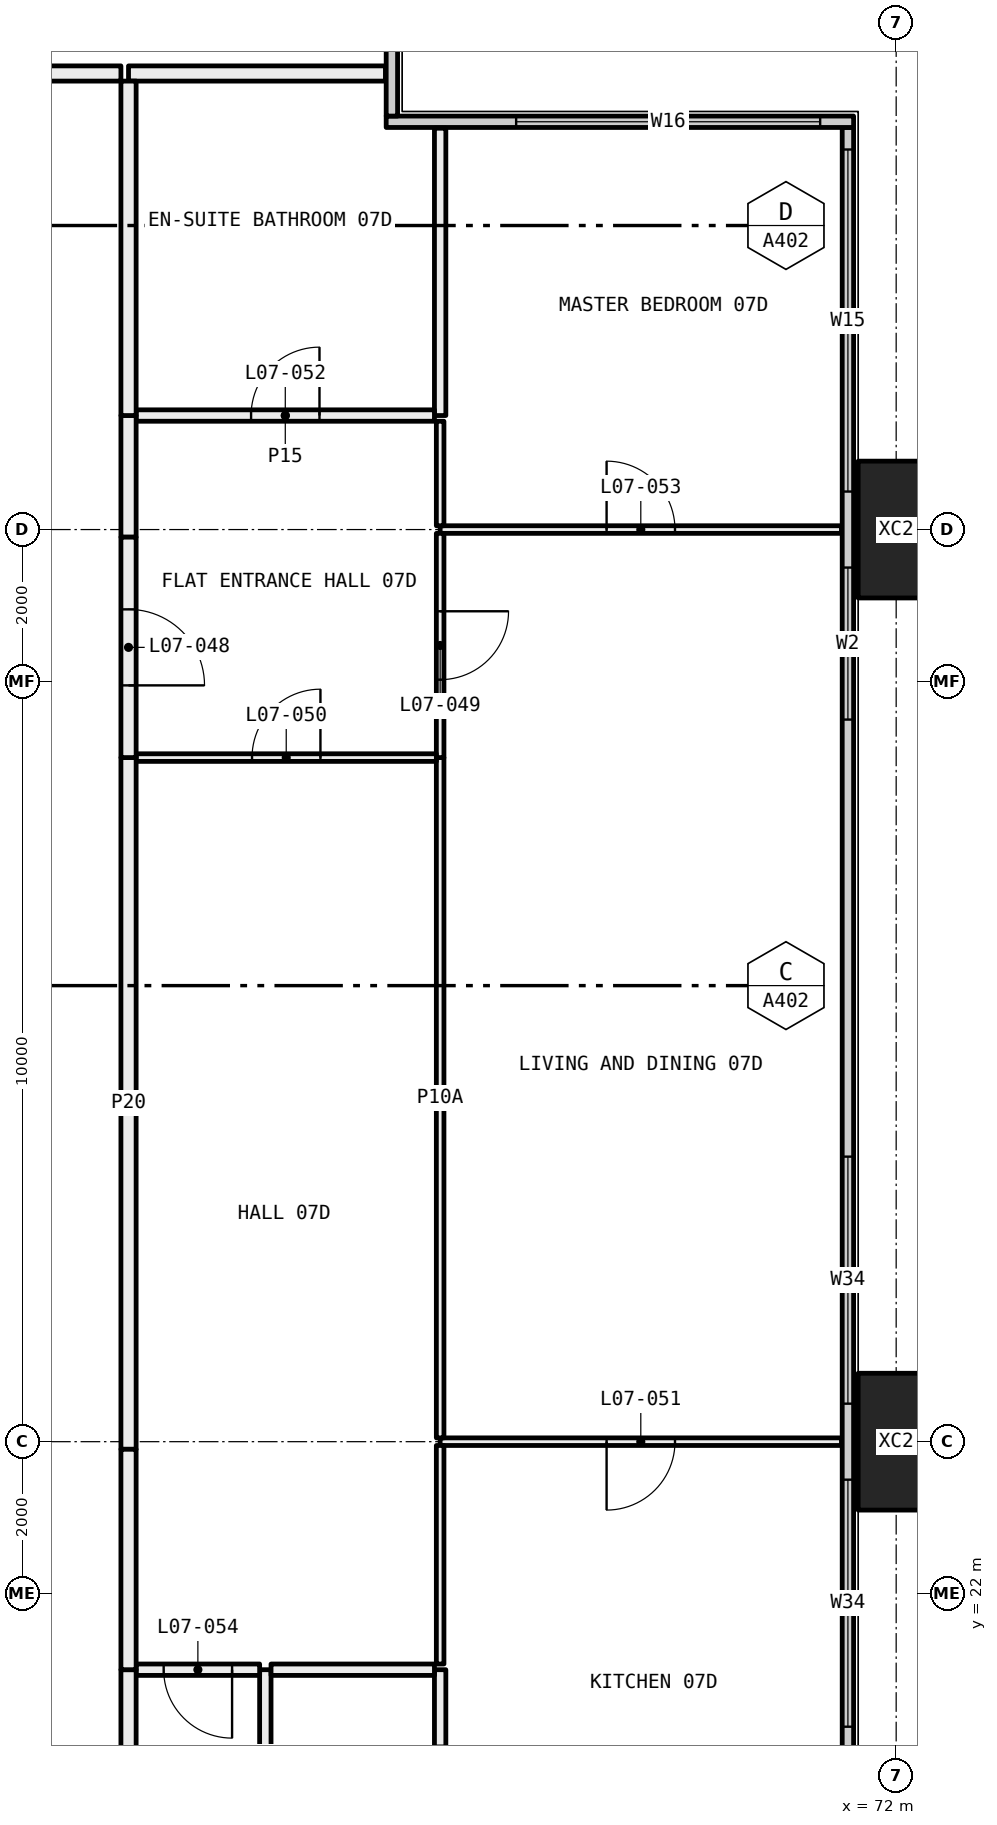
"""IFC4 building model, lengths in metres.
Left out: names, types, materials, properties, quantities, classifications, styles, units other than length and angle.
Written with IfcOpenShell. Run it as: python <this file> out.ifc"""

import sys

from ifc_helpers import new_model, si_unit, direction, frame, frame_2d, origin, origin_2d, place, context, subcontext, project, spatial, rectangle, hollow_rectangle, extrude, element, fill, save


model = new_model("IFC4")
c1 = context("Model", 3, precision=1e-05, world=origin(), true_north=direction((0.0, 1.0)))
c2 = subcontext(c1, "Body", "Model", "MODEL_VIEW")
j1 = project(units=[si_unit("LENGTHUNIT", "METRE"), si_unit("PLANEANGLEUNIT", "RADIAN")], contexts=[c1])
p1 = place(None, origin())
s1 = spatial("IfcSite", under=j1, at=p1, CompositionType="ELEMENT")
p2 = place(p1, origin())
s2 = spatial("IfcBuilding", under=s1, at=p2, CompositionType="ELEMENT")
p3 = place(p2, frame((0.0, 0.0, 36.9)))
s3 = spatial("IfcBuildingStorey", under=s2, at=p3, CompositionType="ELEMENT", Elevation=36.9)
for number, where, z_axis, x_axis in (
    (1, (72.0, 24.0, -0.4), (0.0, 0.0, 1.0), (0.0, 1.0, 0.0)),
    (2, (72.0, 36.0, -0.4), (0.0, 0.0, 1.0), (0.0, 1.0, 0.0)),
):
    element("IfcColumn", number, at=place(p3, frame(where, z_axis=z_axis, x_axis=x_axis)), inside=s3, PredefinedType="COLUMN", context=c2, shape_type="SweptSolid", body=[
        extrude(hollow_rectangle(XDim=1.8, YDim=1.0, WallThickness=0.07, at=origin_2d()), origin(), (0.0, 0.0, 1.0), 3.45),
    ])
p4 = place(p3, frame((71.365, 6.71, 0.0), z_axis=(0.0, 0.0, 1.0), x_axis=(0.0, 1.0, 0.0)))
e3 = element("IfcWall", 3, at=p4, inside=s3, PredefinedType="ELEMENTEDWALL", context=c2, shape_type="SweptSolid", body=[
    extrude(rectangle(XDim=34.58, YDim=0.15, at=frame_2d((17.29, 0.0))), origin(), (0.0, 0.0, 1.0), 3.05),
])
p5 = place(p4, frame((0.29, 0.0, 0.45)))
e4 = element("IfcOpeningElement", 4, at=p5, cuts=e3, PredefinedType="OPENING", context=c2, shape_type="SweptSolid", body=[
    extrude(rectangle(XDim=4.5, YDim=2.55, at=frame_2d((2.25, 1.275))), frame((0.0, 0.085, 0.0), z_axis=(0.0, -1.0, 0.0), x_axis=(1.0, 0.0, 0.0)), (0.0, 0.0, 1.0), 0.17),
])
p6 = place(p4, frame((5.79, 0.0, 0.45)))
e5 = element("IfcOpeningElement", 5, at=p6, cuts=e3, PredefinedType="OPENING", context=c2, shape_type="SweptSolid", body=[
    extrude(rectangle(XDim=3.25, YDim=2.55, at=frame_2d((1.625, 1.275))), frame((0.0, 0.085, 0.0), z_axis=(0.0, -1.0, 0.0), x_axis=(1.0, 0.0, 0.0)), (0.0, 0.0, 1.0), 0.17),
])
p7 = place(p4, frame((13.54, 0.0, 0.45)))
e6 = element("IfcOpeningElement", 6, at=p7, cuts=e3, PredefinedType="OPENING", context=c2, shape_type="SweptSolid", body=[
    extrude(rectangle(XDim=3.25, YDim=2.55, at=frame_2d((1.625, 1.275))), frame((0.0, 0.085, 0.0), z_axis=(0.0, -1.0, 0.0), x_axis=(1.0, 0.0, 0.0)), (0.0, 0.0, 1.0), 0.17),
])
p8 = place(p4, frame((17.79, 0.0, 0.45)))
e7 = element("IfcOpeningElement", 7, at=p8, cuts=e3, PredefinedType="OPENING", context=c2, shape_type="SweptSolid", body=[
    extrude(rectangle(XDim=3.25, YDim=2.55, at=frame_2d((1.625, 1.275))), frame((0.0, 0.085, 0.0), z_axis=(0.0, -1.0, 0.0), x_axis=(1.0, 0.0, 0.0)), (0.0, 0.0, 1.0), 0.17),
])
p9 = place(p4, frame((26.79, 0.0, 0.45)))
e8 = element("IfcOpeningElement", 8, at=p9, cuts=e3, PredefinedType="OPENING", context=c2, shape_type="SweptSolid", body=[
    extrude(rectangle(XDim=2.0, YDim=2.55, at=frame_2d((1.0, 1.275))), frame((0.0, 0.085, 0.0), z_axis=(0.0, -1.0, 0.0), x_axis=(1.0, 0.0, 0.0)), (0.0, 0.0, 1.0), 0.17),
])
p10 = place(p4, frame((29.79, 0.0, 0.45)))
e9 = element("IfcOpeningElement", 9, at=p10, cuts=e3, PredefinedType="OPENING", context=c2, shape_type="SweptSolid", body=[
    extrude(rectangle(XDim=4.5, YDim=2.55, at=frame_2d((2.25, 1.275))), frame((0.0, 0.085, 0.0), z_axis=(0.0, -1.0, 0.0), x_axis=(1.0, 0.0, 0.0)), (0.0, 0.0, 1.0), 0.17),
])
p11 = place(p3, frame((65.29, 41.365, 0.0), z_axis=(0.0, 0.0, 1.0), x_axis=(1.0, 0.0, 0.0)))
e10 = element("IfcWall", 10, at=p11, inside=s3, PredefinedType="ELEMENTEDWALL", context=c2, shape_type="SweptSolid", body=[
    extrude(rectangle(XDim=6.15, YDim=0.15, at=frame_2d((3.075, 0.0))), origin(), (0.0, 0.0, 1.0), 3.05),
])
p12 = place(p11, frame((1.71, 0.0, 0.45)))
e11 = element("IfcOpeningElement", 11, at=p12, cuts=e10, PredefinedType="OPENING", context=c2, shape_type="SweptSolid", body=[
    extrude(rectangle(XDim=4.0, YDim=2.55, at=frame_2d((2.0, 1.275))), frame((0.0, 0.085, 0.0), z_axis=(0.0, -1.0, 0.0), x_axis=(1.0, 0.0, 0.0)), (0.0, 0.0, 1.0), 0.17),
])
p13 = place(p3, frame((65.365, 41.44, 0.0), z_axis=(0.0, 0.0, 1.0), x_axis=(0.0, 1.0, 0.0)))
e12 = element("IfcWall", 12, at=p13, inside=s3, PredefinedType="ELEMENTEDWALL", context=c2, shape_type="SweptSolid", body=[
    extrude(rectangle(XDim=5.85, YDim=0.15, at=frame_2d((2.925, 0.0))), origin(), (0.0, 0.0, 1.0), 3.05),
])
p14 = place(p13, frame((1.56, 0.0, 0.45)))
e13 = element("IfcOpeningElement", 13, at=p14, cuts=e12, PredefinedType="OPENING", context=c2, shape_type="SweptSolid", body=[
    extrude(rectangle(XDim=4.0, YDim=2.55, at=frame_2d((2.0, 1.275))), frame((0.0, 0.085, 0.0), z_axis=(0.0, -1.0, 0.0), x_axis=(1.0, 0.0, 0.0)), (0.0, 0.0, 1.0), 0.17),
])
p15 = place(p3, frame((71.28, 24.0, 0.0), z_axis=(0.0, 0.0, 1.0), x_axis=(-1.0, 0.0, 0.0)))
e14 = element("IfcWall", 14, at=p15, inside=s3, PredefinedType="PARTITIONING", context=c2, shape_type="SweptSolid", body=[
    extrude(rectangle(XDim=5.28, YDim=0.1, at=frame_2d((2.64, 0.0))), origin(), (0.0, 0.0, 1.0), 2.45),
])
p16 = place(p15, frame((2.19, 0.0, 0.0)))
e15 = element("IfcOpeningElement", 15, at=p16, cuts=e14, PredefinedType="OPENING", context=c2, shape_type="SweptSolid", body=[
    extrude(rectangle(XDim=0.9, YDim=2.1, at=frame_2d((0.45, 1.05))), frame((0.0, 0.06, 0.0), z_axis=(0.0, -1.0, 0.0), x_axis=(1.0, 0.0, 0.0)), (0.0, 0.0, 1.0), 0.12),
])
p17 = place(p3, frame((66.0, 21.0, 0.0), z_axis=(0.0, 0.0, 1.0), x_axis=(0.0, -1.0, 0.0)))
e16 = element("IfcWall", 16, at=p17, inside=s3, PredefinedType="PARTITIONING", context=c2, shape_type="SweptSolid", body=[
    extrude(rectangle(XDim=2.9, YDim=0.15, at=frame_2d((1.45, 0.0))), origin(), (0.0, 0.0, 1.0), 3.05),
])
p18 = place(p17, frame((1.0, 0.0, 0.0)))
e17 = element("IfcOpeningElement", 17, at=p18, cuts=e16, PredefinedType="OPENING", context=c2, shape_type="SweptSolid", body=[
    extrude(rectangle(XDim=0.9, YDim=2.1, at=frame_2d((0.45, 1.05))), frame((0.0, 0.085, 0.0), z_axis=(0.0, -1.0, 0.0), x_axis=(1.0, 0.0, 0.0)), (0.0, 0.0, 1.0), 0.17),
])
p19 = place(p3, frame((66.0, 23.95, 0.0), z_axis=(0.0, 0.0, 1.0), x_axis=(0.0, -1.0, 0.0)))
e18 = element("IfcWall", 18, at=p19, inside=s3, PredefinedType="PARTITIONING", context=c2, shape_type="SweptSolid", body=[
    extrude(rectangle(XDim=2.875, YDim=0.1, at=frame_2d((1.438, 0.0))), origin(), (0.0, 0.0, 1.0), 2.45),
])
p20 = place(p3, frame((71.28, 36.0, 0.0), z_axis=(0.0, 0.0, 1.0), x_axis=(-1.0, 0.0, 0.0)))
e19 = element("IfcWall", 19, at=p20, inside=s3, PredefinedType="PARTITIONING", context=c2, shape_type="SweptSolid", body=[
    extrude(rectangle(XDim=5.28, YDim=0.1, at=frame_2d((2.64, 0.0))), origin(), (0.0, 0.0, 1.0), 2.45),
])
p21 = place(p20, frame((2.19, 0.0, 0.0)))
e20 = element("IfcOpeningElement", 20, at=p21, cuts=e19, PredefinedType="OPENING", context=c2, shape_type="SweptSolid", body=[
    extrude(rectangle(XDim=0.9, YDim=2.1, at=frame_2d((0.45, 1.05))), frame((0.0, 0.06, 0.0), z_axis=(0.0, -1.0, 0.0), x_axis=(1.0, 0.0, 0.0)), (0.0, 0.0, 1.0), 0.12),
])
p22 = place(p3, frame((66.0, 33.0, 0.0), z_axis=(0.0, 0.0, 1.0), x_axis=(0.0, -1.0, 0.0)))
e21 = element("IfcWall", 21, at=p22, inside=s3, PredefinedType="PARTITIONING", context=c2, shape_type="SweptSolid", body=[
    extrude(rectangle(XDim=8.95, YDim=0.1, at=frame_2d((4.475, 0.0))), origin(), (0.0, 0.0, 1.0), 2.45),
])
p23 = place(p3, frame((66.0, 35.95, 0.0), z_axis=(0.0, 0.0, 1.0), x_axis=(0.0, -1.0, 0.0)))
e22 = element("IfcWall", 22, at=p23, inside=s3, PredefinedType="PARTITIONING", context=c2, shape_type="SweptSolid", body=[
    extrude(rectangle(XDim=2.95, YDim=0.1, at=frame_2d((1.475, 0.0))), origin(), (0.0, 0.0, 1.0), 2.45),
])
p24 = place(p23, frame((1.025, 0.0, 0.0)))
e23 = element("IfcOpeningElement", 23, at=p24, cuts=e22, PredefinedType="OPENING", context=c2, shape_type="SweptSolid", body=[
    extrude(rectangle(XDim=0.9, YDim=2.1, at=frame_2d((0.45, 1.05))), frame((0.0, 0.06, 0.0), z_axis=(0.0, -1.0, 0.0), x_axis=(1.0, 0.0, 0.0)), (0.0, 0.0, 1.0), 0.12),
])
p25 = place(p3, frame((66.0, 37.425, 0.0), z_axis=(0.0, 0.0, 1.0), x_axis=(0.0, -1.0, 0.0)))
e24 = element("IfcWall", 24, at=p25, inside=s3, PredefinedType="PARTITIONING", context=c2, shape_type="SweptSolid", body=[
    extrude(rectangle(XDim=1.375, YDim=0.1, at=frame_2d((0.688, 0.0))), origin(), (0.0, 0.0, 1.0), 2.45),
])
p26 = place(p3, frame((66.0, 41.28, 0.0), z_axis=(0.0, 0.0, 1.0), x_axis=(0.0, -1.0, 0.0)))
e25 = element("IfcWall", 25, at=p26, inside=s3, PredefinedType="PARTITIONING", context=c2, shape_type="SweptSolid", body=[
    extrude(rectangle(XDim=3.78, YDim=0.15, at=frame_2d((1.89, 0.0))), origin(), (0.0, 0.0, 1.0), 3.05),
])
p27 = place(p3, frame((63.7, 18.1, 0.0), z_axis=(0.0, 0.0, 1.0), x_axis=(0.0, 1.0, 0.0)))
e26 = element("IfcWall", 26, at=p27, inside=s3, PredefinedType="PARTITIONING", context=c2, shape_type="SweptSolid", body=[
    extrude(rectangle(XDim=2.9, YDim=0.15, at=frame_2d((1.45, 0.0))), origin(), (0.0, 0.0, 1.0), 3.05),
])
p28 = place(p3, frame((63.625, 21.0, 0.0), z_axis=(0.0, 0.0, 1.0), x_axis=(-1.0, 0.0, 0.0)))
e27 = element("IfcWall", 27, at=p28, inside=s3, PredefinedType="PARTITIONING", context=c2, shape_type="SweptSolid", body=[
    extrude(rectangle(XDim=1.625, YDim=0.15, at=frame_2d((0.812, 0.0))), origin(), (0.0, 0.0, 1.0), 3.05),
])
p29 = place(p28, frame((0.363, 0.0, 0.0)))
e28 = element("IfcOpeningElement", 28, at=p29, cuts=e27, PredefinedType="OPENING", context=c2, shape_type="SweptSolid", body=[
    extrude(rectangle(XDim=0.9, YDim=2.1, at=frame_2d((0.45, 1.05))), frame((0.0, 0.085, 0.0), z_axis=(0.0, -1.0, 0.0), x_axis=(1.0, 0.0, 0.0)), (0.0, 0.0, 1.0), 0.17),
])
p30 = place(p3, frame((61.9, 21.0, 0.0), z_axis=(0.0, 0.0, 1.0), x_axis=(0.0, -1.0, 0.0)))
e29 = element("IfcWall", 29, at=p30, inside=s3, PredefinedType="PARTITIONING", context=c2, shape_type="SweptSolid", body=[
    extrude(rectangle(XDim=2.9, YDim=0.2, at=frame_2d((1.45, 0.0))), origin(), (0.0, 0.0, 1.0), 3.05),
])
p31 = place(p3, frame((65.925, 21.0, 0.0), z_axis=(0.0, 0.0, 1.0), x_axis=(-1.0, 0.0, 0.0)))
e30 = element("IfcWall", 30, at=p31, inside=s3, PredefinedType="PARTITIONING", context=c2, shape_type="SweptSolid", body=[
    extrude(rectangle(XDim=2.15, YDim=0.15, at=frame_2d((1.075, 0.0))), origin(), (0.0, 0.0, 1.0), 3.05),
])
p32 = place(p3, frame((65.95, 33.0, 0.0), z_axis=(0.0, 0.0, 1.0), x_axis=(-1.0, 0.0, 0.0)))
e31 = element("IfcWall", 31, at=p32, inside=s3, PredefinedType="PARTITIONING", context=c2, shape_type="SweptSolid", body=[
    extrude(rectangle(XDim=3.95, YDim=0.1, at=frame_2d((1.975, 0.0))), origin(), (0.0, 0.0, 1.0), 3.05),
])
p33 = place(p32, frame((1.525, 0.0, 0.0)))
e32 = element("IfcOpeningElement", 32, at=p33, cuts=e31, PredefinedType="OPENING", context=c2, shape_type="SweptSolid", body=[
    extrude(rectangle(XDim=0.9, YDim=2.1, at=frame_2d((0.45, 1.05))), frame((0.0, 0.06, 0.0), z_axis=(0.0, -1.0, 0.0), x_axis=(1.0, 0.0, 0.0)), (0.0, 0.0, 1.0), 0.12),
])
p34 = place(p3, frame((61.9, 33.0, 0.0), z_axis=(0.0, 0.0, 1.0), x_axis=(0.0, -1.0, 0.0)))
e33 = element("IfcWall", 33, at=p34, inside=s3, PredefinedType="PARTITIONING", context=c2, shape_type="SweptSolid", body=[
    extrude(rectangle(XDim=9.1, YDim=0.2, at=frame_2d((4.55, 0.0))), origin(), (0.0, 0.0, 1.0), 2.45),
])
p35 = place(p3, frame((61.9, 23.9, 0.0), z_axis=(0.0, 0.0, 1.0), x_axis=(0.0, -1.0, 0.0)))
e34 = element("IfcWall", 34, at=p35, inside=s3, PredefinedType="PARTITIONING", context=c2, shape_type="SweptSolid", body=[
    extrude(rectangle(XDim=2.9, YDim=0.2, at=frame_2d((1.45, 0.0))), origin(), (0.0, 0.0, 1.0), 3.05),
])
p36 = place(p3, frame((65.925, 37.5, 0.0), z_axis=(0.0, 0.0, 1.0), x_axis=(-1.0, 0.0, 0.0)))
e35 = element("IfcWall", 35, at=p36, inside=s3, PredefinedType="PARTITIONING", context=c2, shape_type="SweptSolid", body=[
    extrude(rectangle(XDim=3.925, YDim=0.15, at=frame_2d((1.962, 0.0))), origin(), (0.0, 0.0, 1.0), 3.05),
])
p37 = place(p36, frame((1.512, 0.0, 0.0)))
e36 = element("IfcOpeningElement", 36, at=p37, cuts=e35, PredefinedType="OPENING", context=c2, shape_type="SweptSolid", body=[
    extrude(rectangle(XDim=0.9, YDim=2.1, at=frame_2d((0.45, 1.05))), frame((0.0, 0.085, 0.0), z_axis=(0.0, -1.0, 0.0), x_axis=(1.0, 0.0, 0.0)), (0.0, 0.0, 1.0), 0.17),
])
p38 = place(p3, frame((61.9, 37.5, 0.0), z_axis=(0.0, 0.0, 1.0), x_axis=(0.0, -1.0, 0.0)))
e37 = element("IfcWall", 37, at=p38, inside=s3, PredefinedType="PARTITIONING", context=c2, shape_type="SweptSolid", body=[
    extrude(rectangle(XDim=1.6, YDim=0.2, at=frame_2d((0.8, 0.0))), origin(), (0.0, 0.0, 1.0), 2.45),
])
p39 = place(p3, frame((61.9, 35.9, 0.0), z_axis=(0.0, 0.0, 1.0), x_axis=(0.0, -1.0, 0.0)))
e38 = element("IfcWall", 38, at=p39, inside=s3, PredefinedType="PARTITIONING", context=c2, shape_type="SweptSolid", body=[
    extrude(rectangle(XDim=2.9, YDim=0.2, at=frame_2d((1.45, 0.0))), origin(), (0.0, 0.0, 1.0), 3.05),
])
p40 = place(p39, frame((0.95, 0.0, 0.0)))
e39 = element("IfcOpeningElement", 39, at=p40, cuts=e38, PredefinedType="OPENING", context=c2, shape_type="SweptSolid", body=[
    extrude(rectangle(XDim=1.0, YDim=2.1, at=frame_2d((0.5, 1.05))), frame((0.0, 0.11, 0.0), z_axis=(0.0, -1.0, 0.0), x_axis=(1.0, 0.0, 0.0)), (0.0, 0.0, 1.0), 0.22),
])
p41 = place(p3, frame((65.28, 42.0, 0.0), z_axis=(0.0, 0.0, 1.0), x_axis=(-1.0, 0.0, 0.0)))
e40 = element("IfcWall", 40, at=p41, inside=s3, PredefinedType="PARTITIONING", context=c2, shape_type="SweptSolid", body=[
    extrude(rectangle(XDim=3.38, YDim=0.2, at=frame_2d((1.69, 0.0))), origin(), (0.0, 0.0, 1.0), 3.05),
])
p42 = place(p3, frame((61.9, 41.9, 0.0), z_axis=(0.0, 0.0, 1.0), x_axis=(0.0, -1.0, 0.0)))
e41 = element("IfcWall", 41, at=p42, inside=s3, PredefinedType="PARTITIONING", context=c2, shape_type="SweptSolid", body=[
    extrude(rectangle(XDim=4.4, YDim=0.2, at=frame_2d((2.2, 0.0))), origin(), (0.0, 0.0, 1.0), 3.05),
])
p43 = place(p3, frame((60.0, 42.0, 0.0), z_axis=(0.0, 0.0, 1.0), x_axis=(1.0, 0.0, 0.0)))
e42 = element("IfcWall", 42, at=p43, inside=s3, PredefinedType="PARTITIONING", context=c2, shape_type="SweptSolid", body=[
    extrude(rectangle(XDim=1.8, YDim=0.2, at=frame_2d((0.9, 0.0))), origin(), (0.0, 0.0, 1.0), 3.05),
])
p44 = place(p7, origin())
e43 = element("IfcWindow", 43, at=p44, inside=s3, PartitioningType="SINGLE_PANEL", PredefinedType="WINDOW", context=c2, shape_type="SweptSolid", body=[
    extrude(rectangle(XDim=3.25, YDim=2.55, at=frame_2d((1.625, 1.275))), frame((0.0, 0.03, 0.0), z_axis=(0.0, -1.0, 0.0), x_axis=(1.0, 0.0, 0.0)), (0.0, 0.0, 1.0), 0.06),
])
fill(e6, e43)
p45 = place(p8, origin())
e44 = element("IfcWindow", 44, at=p45, inside=s3, PartitioningType="SINGLE_PANEL", PredefinedType="WINDOW", context=c2, shape_type="SweptSolid", body=[
    extrude(rectangle(XDim=3.25, YDim=2.55, at=frame_2d((1.625, 1.275))), frame((0.0, 0.03, 0.0), z_axis=(0.0, -1.0, 0.0), x_axis=(1.0, 0.0, 0.0)), (0.0, 0.0, 1.0), 0.06),
])
fill(e7, e44)
p46 = place(p9, origin())
e45 = element("IfcWindow", 45, at=p46, inside=s3, PartitioningType="SINGLE_PANEL", PredefinedType="WINDOW", context=c2, shape_type="SweptSolid", body=[
    extrude(rectangle(XDim=2.0, YDim=2.55, at=frame_2d((1.0, 1.275))), frame((0.0, 0.03, 0.0), z_axis=(0.0, -1.0, 0.0), x_axis=(1.0, 0.0, 0.0)), (0.0, 0.0, 1.0), 0.06),
])
fill(e8, e45)
p47 = place(p10, origin())
e46 = element("IfcWindow", 46, at=p47, inside=s3, PartitioningType="SINGLE_PANEL", PredefinedType="WINDOW", context=c2, shape_type="SweptSolid", body=[
    extrude(rectangle(XDim=4.5, YDim=2.55, at=frame_2d((2.25, 1.275))), frame((0.0, 0.03, 0.0), z_axis=(0.0, -1.0, 0.0), x_axis=(1.0, 0.0, 0.0)), (0.0, 0.0, 1.0), 0.06),
])
fill(e9, e46)
p48 = place(p12, origin())
e47 = element("IfcWindow", 47, at=p48, inside=s3, PartitioningType="SINGLE_PANEL", PredefinedType="WINDOW", context=c2, shape_type="SweptSolid", body=[
    extrude(rectangle(XDim=4.0, YDim=2.55, at=frame_2d((2.0, 1.275))), frame((0.0, 0.03, 0.0), z_axis=(0.0, -1.0, 0.0), x_axis=(1.0, 0.0, 0.0)), (0.0, 0.0, 1.0), 0.06),
])
fill(e11, e47)
p49 = place(p40, origin())
e48 = element("IfcDoor", 48, at=p49, inside=s3, OperationType="SINGLE_SWING_LEFT", PredefinedType="DOOR", context=c2, shape_type="SweptSolid", body=[
    extrude(rectangle(XDim=1.0, YDim=2.1, at=frame_2d((0.5, 1.05))), frame((0.0, 0.025, 0.0), z_axis=(0.0, -1.0, 0.0), x_axis=(1.0, 0.0, 0.0)), (0.0, 0.0, 1.0), 0.05),
])
fill(e39, e48)
p50 = place(p24, origin())
e49 = element("IfcDoor", 49, at=p50, inside=s3, OperationType="SINGLE_SWING_RIGHT", PredefinedType="DOOR", context=c2, shape_type="SweptSolid", body=[
    extrude(rectangle(XDim=0.9, YDim=2.1, at=frame_2d((0.45, 1.05))), frame((0.0, 0.025, 0.0), z_axis=(0.0, -1.0, 0.0), x_axis=(1.0, 0.0, 0.0)), (0.0, 0.0, 1.0), 0.05),
])
fill(e23, e49)
p51 = place(p33, frame((0.9, 0.0, 0.0), x_axis=(-1.0, 0.0, 0.0)))
e50 = element("IfcDoor", 50, at=p51, inside=s3, OperationType="SINGLE_SWING_LEFT", PredefinedType="DOOR", context=c2, shape_type="SweptSolid", body=[
    extrude(rectangle(XDim=0.9, YDim=2.1, at=frame_2d((0.45, 1.05))), frame((0.0, 0.025, 0.0), z_axis=(0.0, -1.0, 0.0), x_axis=(1.0, 0.0, 0.0)), (0.0, 0.0, 1.0), 0.05),
])
fill(e32, e50)
p52 = place(p16, origin())
e51 = element("IfcDoor", 51, at=p52, inside=s3, OperationType="SINGLE_SWING_LEFT", PredefinedType="DOOR", context=c2, shape_type="SweptSolid", body=[
    extrude(rectangle(XDim=0.9, YDim=2.1, at=frame_2d((0.45, 1.05))), frame((0.0, 0.025, 0.0), z_axis=(0.0, -1.0, 0.0), x_axis=(1.0, 0.0, 0.0)), (0.0, 0.0, 1.0), 0.05),
])
fill(e15, e51)
p53 = place(p37, frame((0.9, 0.0, 0.0), x_axis=(-1.0, 0.0, 0.0)))
e52 = element("IfcDoor", 52, at=p53, inside=s3, OperationType="SINGLE_SWING_LEFT", PredefinedType="DOOR", context=c2, shape_type="SweptSolid", body=[
    extrude(rectangle(XDim=0.9, YDim=2.1, at=frame_2d((0.45, 1.05))), frame((0.0, 0.025, 0.0), z_axis=(0.0, -1.0, 0.0), x_axis=(1.0, 0.0, 0.0)), (0.0, 0.0, 1.0), 0.05),
])
fill(e36, e52)
p54 = place(p21, frame((0.9, 0.0, 0.0), x_axis=(-1.0, 0.0, 0.0)))
e53 = element("IfcDoor", 53, at=p54, inside=s3, OperationType="SINGLE_SWING_RIGHT", PredefinedType="DOOR", context=c2, shape_type="SweptSolid", body=[
    extrude(rectangle(XDim=0.9, YDim=2.1, at=frame_2d((0.45, 1.05))), frame((0.0, 0.025, 0.0), z_axis=(0.0, -1.0, 0.0), x_axis=(1.0, 0.0, 0.0)), (0.0, 0.0, 1.0), 0.05),
])
fill(e20, e53)
p55 = place(p29, origin())
e54 = element("IfcDoor", 54, at=p55, inside=s3, OperationType="SINGLE_SWING_RIGHT", PredefinedType="DOOR", context=c2, shape_type="SweptSolid", body=[
    extrude(rectangle(XDim=0.9, YDim=2.1, at=frame_2d((0.45, 1.05))), frame((0.0, 0.025, 0.0), z_axis=(0.0, -1.0, 0.0), x_axis=(1.0, 0.0, 0.0)), (0.0, 0.0, 1.0), 0.05),
])
fill(e28, e54)
save(model, sys.argv[1])
